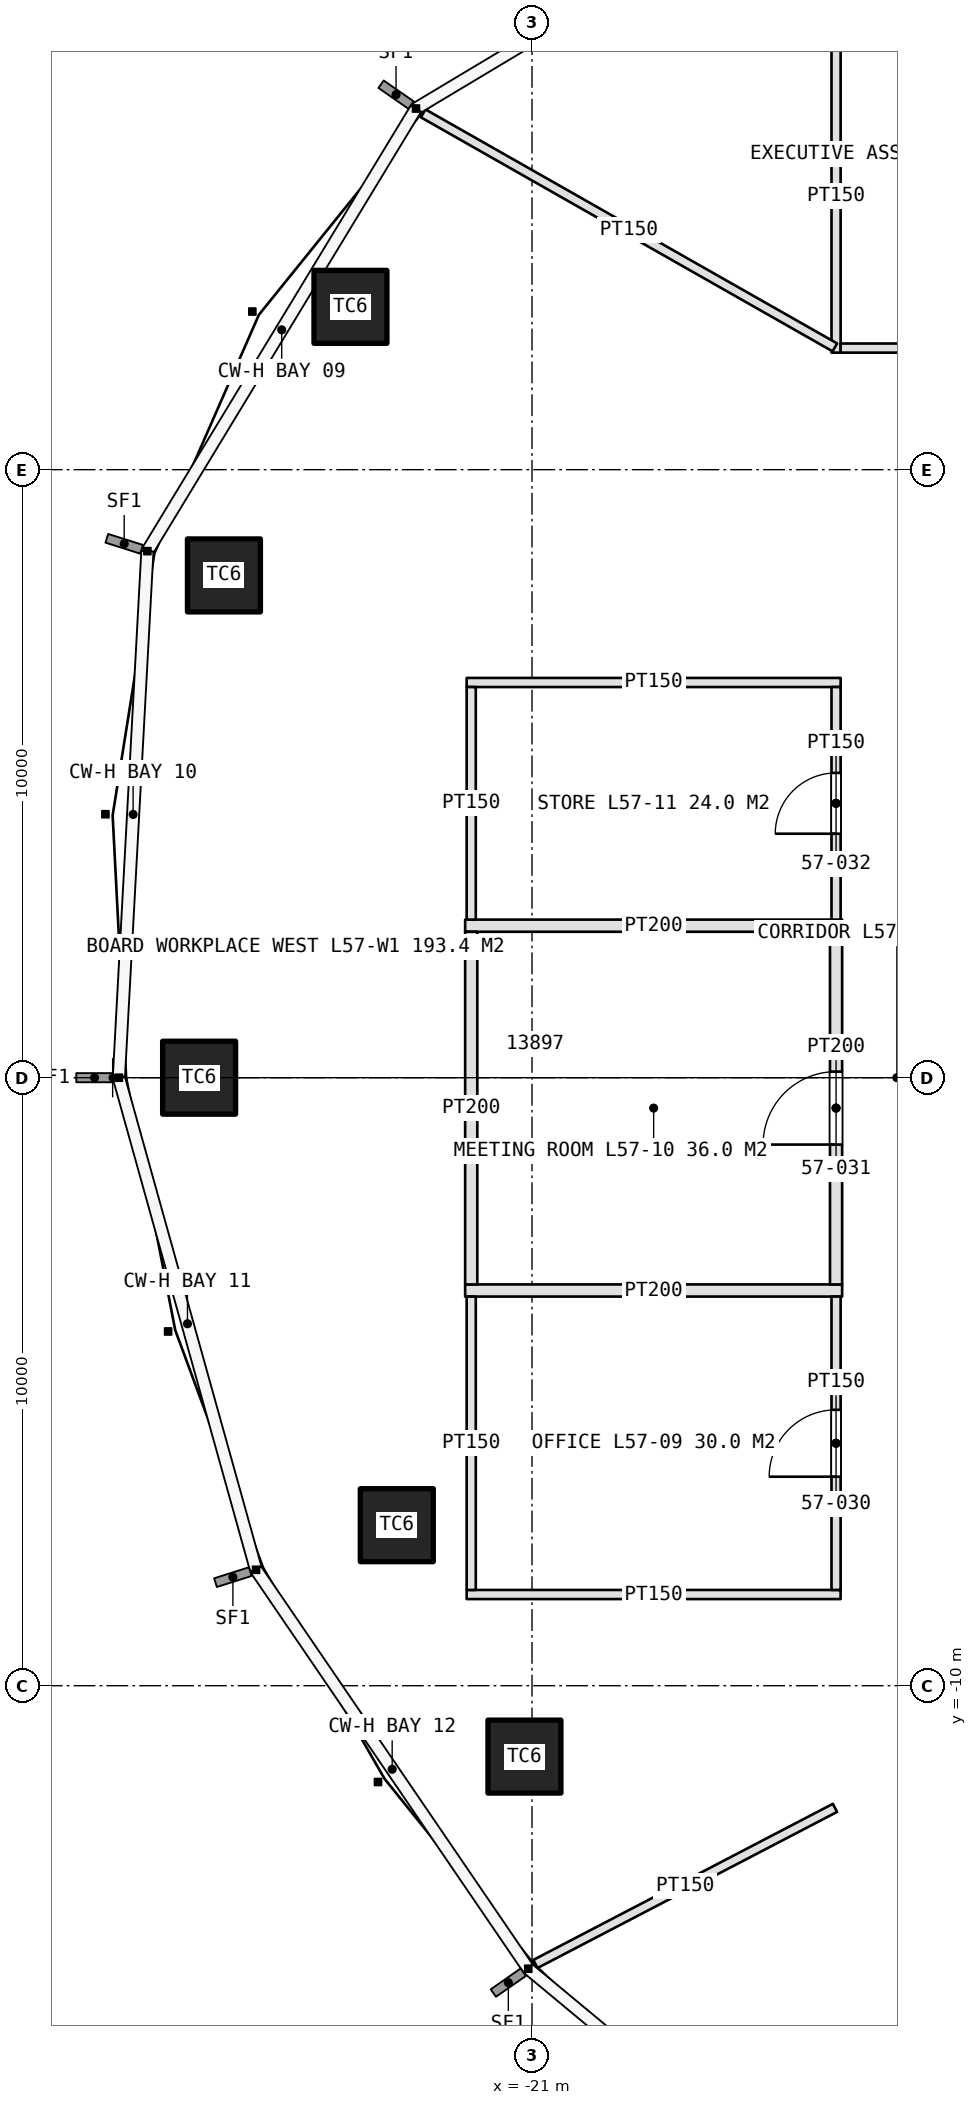
"""IFC4 building model, lengths in metres.
Left out: names, types, materials, properties, quantities, classifications, styles, units other than length and angle.
Written with IfcOpenShell. Run it as: python <this file> out.ifc"""

import sys

from ifc_helpers import new_model, si_unit, direction, frame, frame_2d, origin, origin_2d, place, context, subcontext, project, spatial, rectangle, extrude, element, fill, save


model = new_model("IFC4")
c1 = context("Model", 3, precision=1e-05, world=origin(), true_north=direction((0.0, 1.0)))
c2 = subcontext(c1, "Body", "Model", "MODEL_VIEW")
j1 = project(units=[si_unit("LENGTHUNIT", "METRE"), si_unit("PLANEANGLEUNIT", "RADIAN")], contexts=[c1])
p1 = place(None, origin())
s1 = spatial("IfcSite", under=j1, at=p1, CompositionType="ELEMENT")
p2 = place(p1, origin())
s2 = spatial("IfcBuilding", under=s1, at=p2, CompositionType="ELEMENT")
p3 = place(p2, frame((0.0, 0.0, 257.8)))
s3 = spatial("IfcBuildingStorey", under=s2, at=p3, CompositionType="ELEMENT", Elevation=257.8)
for number, where, z_axis, x_axis in (
    (1, (-23.986, 12.678, 0.0), (0.0, 0.0, 1.0), (1.0, 0.0, 0.0)),
    (2, (-26.067, 8.261, 0.0), (0.0, 0.0, 1.0), (1.0, 0.0, 0.0)),
    (3, (-26.475, 0.0, 0.0), (0.0, 0.0, 1.0), (1.0, 0.0, 0.0)),
    (4, (-23.224, -7.36, 0.0), (0.0, 0.0, 1.0), (1.0, 0.0, 0.0)),
    (5, (-21.125, -11.166, 0.0), (0.0, 0.0, 1.0), (1.0, 0.0, 0.0)),
):
    element("IfcColumn", number, at=place(p3, frame(where, z_axis=z_axis, x_axis=x_axis)), inside=s3, PredefinedType="COLUMN", context=c2, shape_type="SweptSolid", body=[
        extrude(rectangle(XDim=1.2, YDim=1.2, at=origin_2d()), origin(), (0.0, 0.0, 1.0), 4.2),
    ])
p4 = place(p3, frame((-16.0, 11.925, 0.0), z_axis=(0.0, 0.0, 1.0), x_axis=(0.0, 1.0, 0.0)))
e6 = element("IfcWall", 6, at=p4, inside=s3, PredefinedType="PARTITIONING", context=c2, shape_type="SweptSolid", body=[
    extrude(rectangle(XDim=5.15, YDim=0.15, at=frame_2d((2.575, 0.0))), origin(), (0.0, 0.0, 1.0), 3.0),
])
p5 = place(p3, frame((-15.925, 12.0, 0.0), z_axis=(0.0, 0.0, 1.0), x_axis=(1.0, 0.0, 0.0)))
e7 = element("IfcWall", 7, at=p5, inside=s3, PredefinedType="PARTITIONING", context=c2, shape_type="SweptSolid", body=[
    extrude(rectangle(XDim=4.85, YDim=0.15, at=frame_2d((2.425, 0.0))), origin(), (0.0, 0.0, 1.0), 3.0),
])
p6 = place(p5, frame((1.875, 0.0, 0.0)))
e8 = element("IfcOpeningElement", 8, at=p6, cuts=e7, PredefinedType="OPENING", context=c2, shape_type="SweptSolid", body=[
    extrude(rectangle(XDim=1.1, YDim=2.3, at=frame_2d((0.55, 1.15))), frame((0.0, 0.085, 0.0), z_axis=(0.0, -1.0, 0.0), x_axis=(1.0, 0.0, 0.0)), (0.0, 0.0, 1.0), 0.17),
])
p7 = place(p3, frame((-15.925, -8.5, 0.0), z_axis=(0.0, 0.0, 1.0), x_axis=(-1.0, 0.0, 0.0)))
e9 = element("IfcWall", 9, at=p7, inside=s3, PredefinedType="PARTITIONING", context=c2, shape_type="SweptSolid", body=[
    extrude(rectangle(XDim=6.15, YDim=0.15, at=frame_2d((3.075, 0.0))), origin(), (0.0, 0.0, 1.0), 3.0),
])
for number, where, z_axis, x_axis in (
    (10, (-15.9, -3.5, 0.0), (0.0, 0.0, 1.0), (-1.0, 0.0, 0.0)),
    (11, (-15.9, 2.5, 0.0), (0.0, 0.0, 1.0), (-1.0, 0.0, 0.0)),
):
    element("IfcWall", number, at=place(p3, frame(where, z_axis=z_axis, x_axis=x_axis)), inside=s3, PredefinedType="PARTITIONING", context=c2, shape_type="SweptSolid", body=[
        extrude(rectangle(XDim=6.2, YDim=0.2, at=frame_2d((3.1, 0.0))), origin(), (0.0, 0.0, 1.0), 3.0),
    ])
p8 = place(p3, frame((-15.925, 6.5, 0.0), z_axis=(0.0, 0.0, 1.0), x_axis=(-1.0, 0.0, 0.0)))
e12 = element("IfcWall", 12, at=p8, inside=s3, PredefinedType="PARTITIONING", context=c2, shape_type="SweptSolid", body=[
    extrude(rectangle(XDim=6.15, YDim=0.15, at=frame_2d((3.075, 0.0))), origin(), (0.0, 0.0, 1.0), 3.0),
])
p9 = place(p3, frame((-16.0, -8.425, 0.0), z_axis=(0.0, 0.0, 1.0), x_axis=(0.0, 1.0, 0.0)))
e13 = element("IfcWall", 13, at=p9, inside=s3, PredefinedType="PARTITIONING", context=c2, shape_type="SweptSolid", body=[
    extrude(rectangle(XDim=4.825, YDim=0.15, at=frame_2d((2.413, 0.0))), origin(), (0.0, 0.0, 1.0), 3.0),
])
p10 = place(p9, frame((1.863, 0.0, 0.0)))
e14 = element("IfcOpeningElement", 14, at=p10, cuts=e13, PredefinedType="OPENING", context=c2, shape_type="SweptSolid", body=[
    extrude(rectangle(XDim=1.1, YDim=2.3, at=frame_2d((0.55, 1.15))), frame((0.0, 0.085, 0.0), z_axis=(0.0, -1.0, 0.0), x_axis=(1.0, 0.0, 0.0)), (0.0, 0.0, 1.0), 0.17),
])
p11 = place(p3, frame((-22.0, -8.425, 0.0), z_axis=(0.0, 0.0, 1.0), x_axis=(0.0, 1.0, 0.0)))
e15 = element("IfcWall", 15, at=p11, inside=s3, PredefinedType="PARTITIONING", context=c2, shape_type="SweptSolid", body=[
    extrude(rectangle(XDim=4.825, YDim=0.15, at=frame_2d((2.413, 0.0))), origin(), (0.0, 0.0, 1.0), 3.0),
])
p12 = place(p3, frame((-16.0, -3.4, 0.0), z_axis=(0.0, 0.0, 1.0), x_axis=(0.0, 1.0, 0.0)))
e16 = element("IfcWall", 16, at=p12, inside=s3, PredefinedType="PARTITIONING", context=c2, shape_type="SweptSolid", body=[
    extrude(rectangle(XDim=5.8, YDim=0.2, at=frame_2d((2.9, 0.0))), origin(), (0.0, 0.0, 1.0), 3.0),
])
p13 = place(p12, frame((2.3, 0.0, 0.0)))
e17 = element("IfcOpeningElement", 17, at=p13, cuts=e16, PredefinedType="OPENING", context=c2, shape_type="SweptSolid", body=[
    extrude(rectangle(XDim=1.2, YDim=2.4, at=frame_2d((0.6, 1.2))), frame((0.0, 0.11, 0.0), z_axis=(0.0, -1.0, 0.0), x_axis=(1.0, 0.0, 0.0)), (0.0, 0.0, 1.0), 0.22),
])
p14 = place(p3, frame((-22.0, -3.4, 0.0), z_axis=(0.0, 0.0, 1.0), x_axis=(0.0, 1.0, 0.0)))
e18 = element("IfcWall", 18, at=p14, inside=s3, PredefinedType="PARTITIONING", context=c2, shape_type="SweptSolid", body=[
    extrude(rectangle(XDim=5.8, YDim=0.2, at=frame_2d((2.9, 0.0))), origin(), (0.0, 0.0, 1.0), 3.0),
])
p15 = place(p3, frame((-16.0, 2.6, 0.0), z_axis=(0.0, 0.0, 1.0), x_axis=(0.0, 1.0, 0.0)))
e19 = element("IfcWall", 19, at=p15, inside=s3, PredefinedType="PARTITIONING", context=c2, shape_type="SweptSolid", body=[
    extrude(rectangle(XDim=3.825, YDim=0.15, at=frame_2d((1.913, 0.0))), origin(), (0.0, 0.0, 1.0), 3.0),
])
p16 = place(p15, frame((1.413, 0.0, 0.0)))
e20 = element("IfcOpeningElement", 20, at=p16, cuts=e19, PredefinedType="OPENING", context=c2, shape_type="SweptSolid", body=[
    extrude(rectangle(XDim=1.0, YDim=2.2, at=frame_2d((0.5, 1.1))), frame((0.0, 0.085, 0.0), z_axis=(0.0, -1.0, 0.0), x_axis=(1.0, 0.0, 0.0)), (0.0, 0.0, 1.0), 0.17),
])
p17 = place(p3, frame((-22.0, 2.6, 0.0), z_axis=(0.0, 0.0, 1.0), x_axis=(0.0, 1.0, 0.0)))
e21 = element("IfcWall", 21, at=p17, inside=s3, PredefinedType="PARTITIONING", context=c2, shape_type="SweptSolid", body=[
    extrude(rectangle(XDim=3.825, YDim=0.15, at=frame_2d((1.913, 0.0))), origin(), (0.0, 0.0, 1.0), 3.0),
])
p18 = place(p3, frame((-16.018, -12.009, 0.0), z_axis=(0.0, 0.0, 1.0), x_axis=(-0.886831549241, -0.462092851351, 0.0)))
e22 = element("IfcWall", 22, at=p18, inside=s3, PredefinedType="PARTITIONING", context=c2, shape_type="SweptSolid", body=[
    extrude(rectangle(XDim=5.555, YDim=0.15, at=frame_2d((2.778, 0.0))), origin(), (0.0, 0.0, 1.0), 3.0),
])
p19 = place(p3, frame((-16.02, 12.011, 0.0), z_axis=(0.0, 0.0, 1.0), x_axis=(-0.869354026591, 0.494189818238, 0.0)))
e23 = element("IfcWall", 23, at=p19, inside=s3, PredefinedType="PARTITIONING", context=c2, shape_type="SweptSolid", body=[
    extrude(rectangle(XDim=7.788, YDim=0.15, at=frame_2d((3.894, 0.0))), origin(), (0.0, 0.0, 1.0), 3.0),
])
p20 = place(p10, origin())
e24 = element("IfcDoor", 24, at=p20, inside=s3, OperationType="SINGLE_SWING_LEFT", PredefinedType="DOOR", context=c2, shape_type="SweptSolid", body=[
    extrude(rectangle(XDim=1.1, YDim=2.3, at=frame_2d((0.55, 1.15))), frame((0.0, 0.025, 0.0), z_axis=(0.0, -1.0, 0.0), x_axis=(1.0, 0.0, 0.0)), (0.0, 0.0, 1.0), 0.05),
])
fill(e14, e24)
p21 = place(p13, origin())
e25 = element("IfcDoor", 25, at=p21, inside=s3, OperationType="SINGLE_SWING_LEFT", PredefinedType="DOOR", context=c2, shape_type="SweptSolid", body=[
    extrude(rectangle(XDim=1.2, YDim=2.4, at=frame_2d((0.6, 1.2))), frame((0.0, 0.025, 0.0), z_axis=(0.0, -1.0, 0.0), x_axis=(1.0, 0.0, 0.0)), (0.0, 0.0, 1.0), 0.05),
])
fill(e17, e25)
p22 = place(p16, origin())
e26 = element("IfcDoor", 26, at=p22, inside=s3, OperationType="SINGLE_SWING_LEFT", PredefinedType="DOOR", context=c2, shape_type="SweptSolid", body=[
    extrude(rectangle(XDim=1.0, YDim=2.2, at=frame_2d((0.5, 1.1))), frame((0.0, 0.025, 0.0), z_axis=(0.0, -1.0, 0.0), x_axis=(1.0, 0.0, 0.0)), (0.0, 0.0, 1.0), 0.05),
])
fill(e20, e26)
save(model, sys.argv[1])
